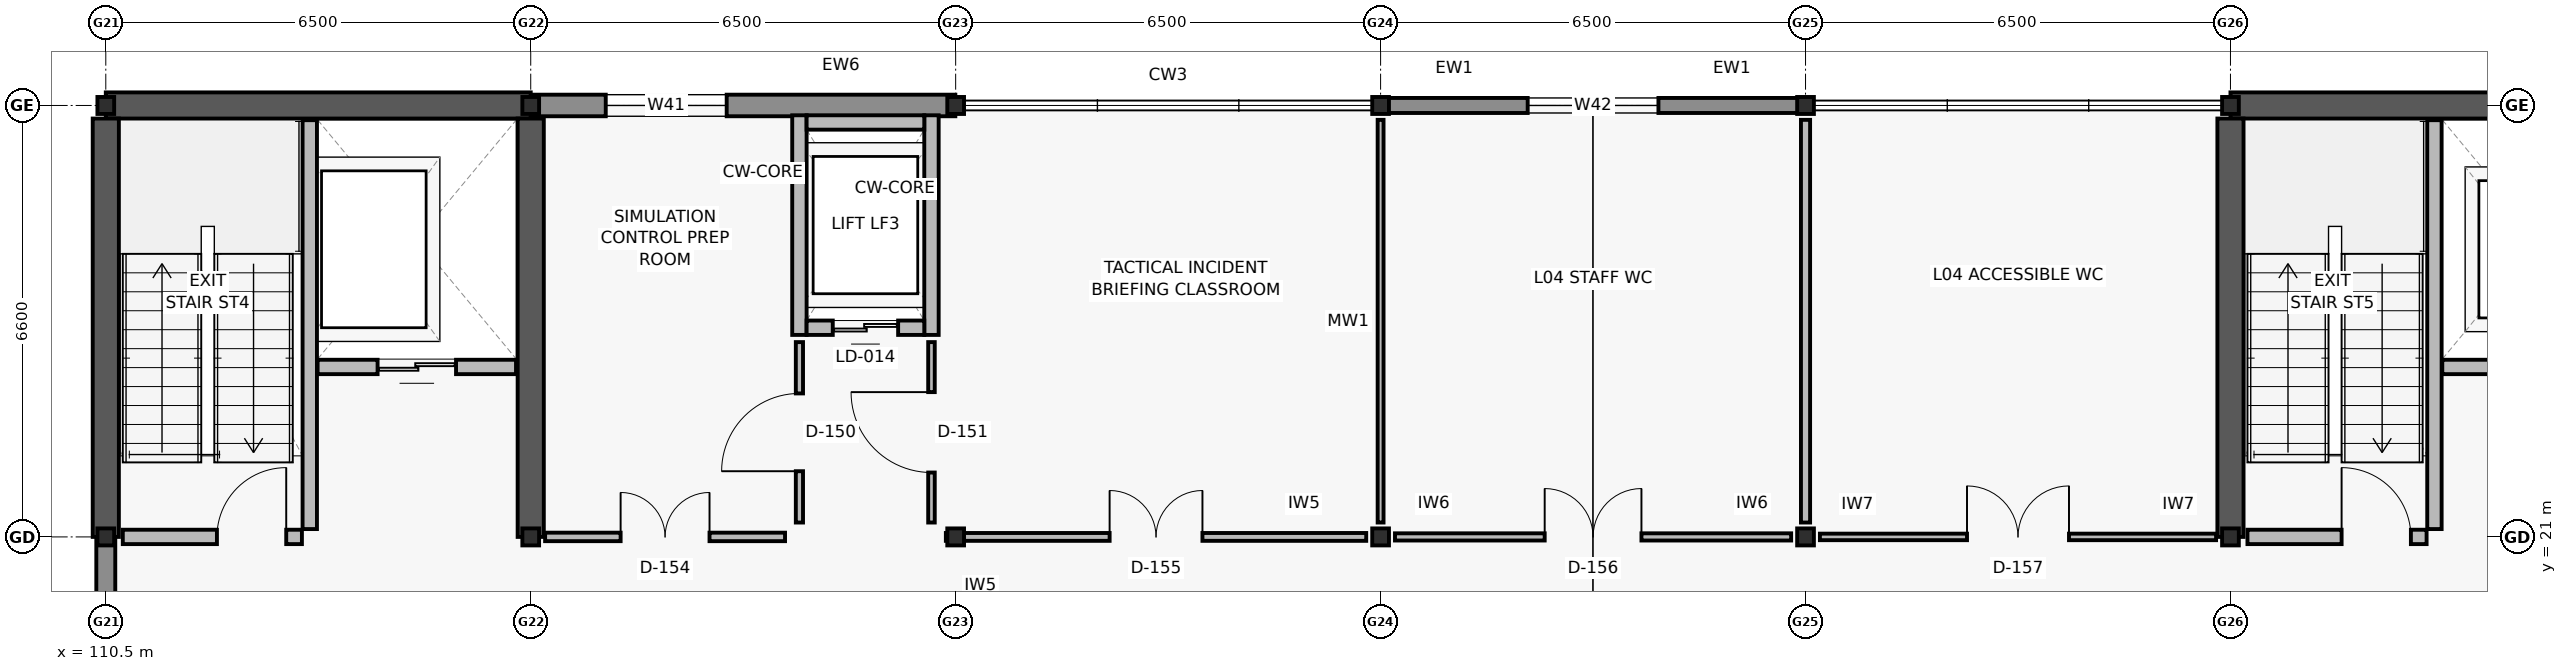
"""IFC4 building model, lengths in metres.
Left out: names, types, materials, properties, quantities, classifications, styles, units other than length and angle.
Written with IfcOpenShell. Run it as: python <this file> out.ifc"""

import sys

from ifc_helpers import new_model, si_unit, direction, frame, frame_2d, origin, origin_2d, place, context, subcontext, project, spatial, rectangle, i_section, extrude, element, fill, save


model = new_model("IFC4")
c1 = context("Model", 3, precision=1e-05, world=origin(), true_north=direction((0.0, 1.0)))
c2 = subcontext(c1, "Body", "Model", "MODEL_VIEW")
j1 = project(units=[si_unit("LENGTHUNIT", "METRE"), si_unit("PLANEANGLEUNIT", "RADIAN")], contexts=[c1])
p1 = place(None, origin())
s1 = spatial("IfcSite", under=j1, at=p1, CompositionType="ELEMENT")
p2 = place(p1, origin())
s2 = spatial("IfcBuilding", under=s1, at=p2, CompositionType="ELEMENT")
p3 = place(p2, frame((0.0, 0.0, 17.4)))
s3 = spatial("IfcBuildingStorey", under=s2, at=p3, CompositionType="ELEMENT", Elevation=17.4)
for number, where, z_axis, x_axis in (
    (1, (110.5, 21.0, 0.0), (0.0, 0.0, 1.0), (1.0, 0.0, 0.0)),
    (2, (110.5, 27.6, 0.0), (0.0, 0.0, 1.0), (1.0, 0.0, 0.0)),
    (3, (117.0, 21.0, 0.0), (0.0, 0.0, 1.0), (1.0, 0.0, 0.0)),
    (4, (117.0, 27.6, 0.0), (0.0, 0.0, 1.0), (1.0, 0.0, 0.0)),
    (5, (123.5, 21.0, 0.0), (0.0, 0.0, 1.0), (1.0, 0.0, 0.0)),
    (6, (123.5, 27.6, 0.0), (0.0, 0.0, 1.0), (1.0, 0.0, 0.0)),
    (7, (130.0, 21.0, 0.0), (0.0, 0.0, 1.0), (1.0, 0.0, 0.0)),
    (8, (130.0, 27.6, 0.0), (0.0, 0.0, 1.0), (1.0, 0.0, 0.0)),
    (9, (136.5, 21.0, 0.0), (0.0, 0.0, 1.0), (1.0, 0.0, 0.0)),
    (10, (136.5, 27.6, 0.0), (0.0, 0.0, 1.0), (1.0, 0.0, 0.0)),
    (11, (143.0, 21.0, 0.0), (0.0, 0.0, 1.0), (1.0, 0.0, 0.0)),
    (12, (143.0, 27.6, 0.0), (0.0, 0.0, 1.0), (1.0, 0.0, 0.0)),
):
    element("IfcColumn", number, at=place(p3, frame(where, z_axis=z_axis, x_axis=x_axis)), inside=s3, PredefinedType="COLUMN", context=c2, shape_type="SweptSolid", body=[
        extrude(i_section(OverallWidth=0.256, OverallDepth=0.26, WebThickness=0.01, FlangeThickness=0.017, FilletRadius=0.013, at=origin_2d()), origin(), (0.0, 0.0, 1.0), 3.9),
    ])
p4 = place(p3, frame((110.5, 27.6, 0.0), z_axis=(0.0, 0.0, 1.0), x_axis=(1.0, 0.0, 0.0)))
e13 = element("IfcWall", 13, at=p4, inside=s3, PredefinedType="SHEAR", context=c2, shape_type="SweptSolid", body=[
    extrude(rectangle(XDim=6.5, YDim=0.4, at=frame_2d((3.25, 0.0))), origin(), (0.0, 0.0, 1.0), 3.66),
])
for number, where, z_axis, x_axis in (
    (14, (110.5, 21.0, 0.0), (0.0, 0.0, 1.0), (0.0, 1.0, 0.0)),
    (15, (117.0, 21.0, 0.0), (0.0, 0.0, 1.0), (0.0, 1.0, 0.0)),
):
    element("IfcWall", number, at=place(p3, frame(where, z_axis=z_axis, x_axis=x_axis)), inside=s3, PredefinedType="SHEAR", context=c2, shape_type="SweptSolid", body=[
        extrude(rectangle(XDim=6.4, YDim=0.4, at=frame_2d((3.2, 0.0))), origin(), (0.0, 0.0, 1.0), 3.66),
    ])
p5 = place(p3, frame((143.0, 27.6, 0.0), z_axis=(0.0, 0.0, 1.0), x_axis=(1.0, 0.0, 0.0)))
e16 = element("IfcWall", 16, at=p5, inside=s3, PredefinedType="SHEAR", context=c2, shape_type="SweptSolid", body=[
    extrude(rectangle(XDim=6.5, YDim=0.4, at=frame_2d((3.25, 0.0))), origin(), (0.0, 0.0, 1.0), 3.66),
])
p6 = place(p3, frame((143.0, 21.0, 0.0), z_axis=(0.0, 0.0, 1.0), x_axis=(0.0, 1.0, 0.0)))
e17 = element("IfcWall", 17, at=p6, inside=s3, PredefinedType="SHEAR", context=c2, shape_type="SweptSolid", body=[
    extrude(rectangle(XDim=6.4, YDim=0.4, at=frame_2d((3.2, 0.0))), origin(), (0.0, 0.0, 1.0), 3.66),
])
p7 = place(p3, frame((117.005, 27.6, 0.0), z_axis=(0.0, 0.0, 1.0), x_axis=(1.0, 0.0, 0.0)))
e18 = element("IfcWall", 18, at=p7, inside=s3, PredefinedType="SOLIDWALL", context=c2, shape_type="SweptSolid", body=[
    extrude(rectangle(XDim=6.49, YDim=0.33, at=frame_2d((3.245, 0.0))), origin(), (0.0, 0.0, 1.0), 3.02),
])
p8 = place(p7, frame((1.143, 0.0, 0.8)))
e19 = element("IfcOpeningElement", 19, at=p8, cuts=e18, PredefinedType="OPENING", context=c2, shape_type="SweptSolid", body=[
    extrude(rectangle(XDim=1.85, YDim=1.55, at=frame_2d((0.925, 0.775))), frame((0.0, 0.175, 0.0), z_axis=(0.0, -1.0, 0.0), x_axis=(1.0, 0.0, 0.0)), (0.0, 0.0, 1.0), 0.35),
])
p9 = place(p3, frame((130.005, 27.6, 0.0), z_axis=(0.0, 0.0, 1.0), x_axis=(1.0, 0.0, 0.0)))
e20 = element("IfcWall", 20, at=p9, inside=s3, PredefinedType="SOLIDWALL", context=c2, shape_type="SweptSolid", body=[
    extrude(rectangle(XDim=6.49, YDim=0.23, at=frame_2d((3.245, 0.0))), origin(), (0.0, 0.0, 1.0), 3.02),
])
p10 = place(p9, frame((2.245, 0.0, 0.8)))
e21 = element("IfcOpeningElement", 21, at=p10, cuts=e20, PredefinedType="OPENING", context=c2, shape_type="SweptSolid", body=[
    extrude(rectangle(XDim=2.0, YDim=1.55, at=frame_2d((1.0, 0.775))), frame((0.0, 0.125, 0.0), z_axis=(0.0, -1.0, 0.0), x_axis=(1.0, 0.0, 0.0)), (0.0, 0.0, 1.0), 0.25),
])
p11 = place(p3, frame((110.5, 14.405, 0.0), z_axis=(0.0, 0.0, 1.0), x_axis=(0.0, 1.0, 0.0)))
e22 = element("IfcWall", 22, at=p11, inside=s3, PredefinedType="SOLIDWALL", context=c2, shape_type="SweptSolid", body=[
    extrude(rectangle(XDim=6.59, YDim=0.29, at=frame_2d((3.295, 0.0))), origin(), (0.0, 0.0, 1.0), 3.02),
])
p12 = place(p11, frame((0.762, 0.0, 0.8)))
e23 = element("IfcOpeningElement", 23, at=p12, cuts=e22, PredefinedType="OPENING", context=c2, shape_type="SweptSolid", body=[
    extrude(rectangle(XDim=2.3, YDim=1.55, at=frame_2d((1.15, 0.775))), frame((0.0, 0.155, 0.0), z_axis=(0.0, -1.0, 0.0), x_axis=(1.0, 0.0, 0.0)), (0.0, 0.0, 1.0), 0.31),
])
p13 = place(p3, frame((113.62, 21.12, 0.0), z_axis=(0.0, 0.0, 1.0), x_axis=(0.0, 1.0, 0.0)))
e24 = element("IfcWall", 24, at=p13, inside=s3, PredefinedType="SOLIDWALL", context=c2, shape_type="SweptSolid", body=[
    extrude(rectangle(XDim=6.255, YDim=0.22, at=frame_2d((3.127, 0.0))), origin(), (0.0, 0.0, 1.0), 3.66),
])
p14 = place(p3, frame((110.76, 21.0, 0.0), z_axis=(0.0, 0.0, 1.0), x_axis=(1.0, 0.0, 0.0)))
e25 = element("IfcWall", 25, at=p14, inside=s3, PredefinedType="SOLIDWALL", context=c2, shape_type="SweptSolid", body=[
    extrude(rectangle(XDim=2.74, YDim=0.22, at=frame_2d((1.37, 0.0))), origin(), (0.0, 0.0, 1.0), 3.02),
])
p15 = place(p14, frame((1.44, 0.0, 0.0)))
e26 = element("IfcOpeningElement", 26, at=p15, cuts=e25, PredefinedType="OPENING", context=c2, shape_type="SweptSolid", body=[
    extrude(rectangle(XDim=1.06, YDim=2.1, at=frame_2d((0.53, 1.05))), frame((0.0, 0.12, 0.0), z_axis=(0.0, -1.0, 0.0), x_axis=(1.0, 0.0, 0.0)), (0.0, 0.0, 1.0), 0.24),
])
p16 = place(p3, frame((113.74, 23.6, 0.0), z_axis=(0.0, 0.0, 1.0), x_axis=(1.0, 0.0, 0.0)))
e27 = element("IfcWall", 27, at=p16, inside=s3, PredefinedType="SOLIDWALL", context=c2, shape_type="SweptSolid", body=[
    extrude(rectangle(XDim=3.035, YDim=0.22, at=frame_2d((1.518, 0.0))), origin(), (0.0, 0.0, 1.0), 3.66),
])
p17 = place(p16, frame((0.917, 0.0, 0.0)))
e28 = element("IfcOpeningElement", 28, at=p17, cuts=e27, PredefinedType="OPENING", context=c2, shape_type="SweptSolid", body=[
    extrude(rectangle(XDim=1.2, YDim=2.15, at=frame_2d((0.6, 1.075))), frame((0.0, 0.12, 0.0), z_axis=(0.0, -1.0, 0.0), x_axis=(1.0, 0.0, 0.0)), (0.0, 0.0, 1.0), 0.24),
])
for number, where, z_axis, x_axis in (
    (29, (121.11, 24.09, 0.0), (0.0, 0.0, 1.0), (0.0, 1.0, 0.0)),
    (30, (123.13, 24.09, 0.0), (0.0, 0.0, 1.0), (0.0, 1.0, 0.0)),
):
    element("IfcWall", number, at=place(p3, frame(where, z_axis=z_axis, x_axis=x_axis)), inside=s3, PredefinedType="SOLIDWALL", context=c2, shape_type="SweptSolid", body=[
        extrude(rectangle(XDim=3.36, YDim=0.22, at=frame_2d((1.68, 0.0))), origin(), (0.0, 0.0, 1.0), 3.66),
    ])
p18 = place(p3, frame((121.22, 27.34, 0.0), z_axis=(0.0, 0.0, 1.0), x_axis=(1.0, 0.0, 0.0)))
e31 = element("IfcWall", 31, at=p18, inside=s3, PredefinedType="SOLIDWALL", context=c2, shape_type="SweptSolid", body=[
    extrude(rectangle(XDim=1.8, YDim=0.22, at=frame_2d((0.9, 0.0))), origin(), (0.0, 0.0, 1.0), 3.66),
])
p19 = place(p3, frame((121.22, 24.2, 0.0), z_axis=(0.0, 0.0, 1.0), x_axis=(1.0, 0.0, 0.0)))
e32 = element("IfcWall", 32, at=p19, inside=s3, PredefinedType="SOLIDWALL", context=c2, shape_type="SweptSolid", body=[
    extrude(rectangle(XDim=1.8, YDim=0.22, at=frame_2d((0.9, 0.0))), origin(), (0.0, 0.0, 1.0), 3.66),
])
p20 = place(p19, frame((0.4, 0.0, 0.0)))
e33 = element("IfcOpeningElement", 33, at=p20, cuts=e32, PredefinedType="OPENING", context=c2, shape_type="SweptSolid", body=[
    extrude(rectangle(XDim=1.0, YDim=2.1, at=frame_2d((0.5, 1.05))), frame((0.0, 0.12, 0.0), z_axis=(0.0, -1.0, 0.0), x_axis=(1.0, 0.0, 0.0)), (0.0, 0.0, 1.0), 0.24),
])
p21 = place(p3, frame((146.12, 21.12, 0.0), z_axis=(0.0, 0.0, 1.0), x_axis=(0.0, 1.0, 0.0)))
e34 = element("IfcWall", 34, at=p21, inside=s3, PredefinedType="SOLIDWALL", context=c2, shape_type="SweptSolid", body=[
    extrude(rectangle(XDim=6.255, YDim=0.22, at=frame_2d((3.127, 0.0))), origin(), (0.0, 0.0, 1.0), 3.66),
])
p22 = place(p3, frame((143.26, 21.0, 0.0), z_axis=(0.0, 0.0, 1.0), x_axis=(1.0, 0.0, 0.0)))
e35 = element("IfcWall", 35, at=p22, inside=s3, PredefinedType="SOLIDWALL", context=c2, shape_type="SweptSolid", body=[
    extrude(rectangle(XDim=2.74, YDim=0.22, at=frame_2d((1.37, 0.0))), origin(), (0.0, 0.0, 1.0), 3.02),
])
p23 = place(p22, frame((1.44, 0.0, 0.0)))
e36 = element("IfcOpeningElement", 36, at=p23, cuts=e35, PredefinedType="OPENING", context=c2, shape_type="SweptSolid", body=[
    extrude(rectangle(XDim=1.06, YDim=2.1, at=frame_2d((0.53, 1.05))), frame((0.0, 0.12, 0.0), z_axis=(0.0, -1.0, 0.0), x_axis=(1.0, 0.0, 0.0)), (0.0, 0.0, 1.0), 0.24),
])
p24 = place(p3, frame((146.24, 23.6, 0.0), z_axis=(0.0, 0.0, 1.0), x_axis=(1.0, 0.0, 0.0)))
e37 = element("IfcWall", 37, at=p24, inside=s3, PredefinedType="SOLIDWALL", context=c2, shape_type="SweptSolid", body=[
    extrude(rectangle(XDim=3.035, YDim=0.22, at=frame_2d((1.518, 0.0))), origin(), (0.0, 0.0, 1.0), 3.66),
])
p25 = place(p24, frame((0.968, 0.0, 0.0)))
e38 = element("IfcOpeningElement", 38, at=p25, cuts=e37, PredefinedType="OPENING", context=c2, shape_type="SweptSolid", body=[
    extrude(rectangle(XDim=1.1, YDim=2.1, at=frame_2d((0.55, 1.05))), frame((0.0, 0.12, 0.0), z_axis=(0.0, -1.0, 0.0), x_axis=(1.0, 0.0, 0.0)), (0.0, 0.0, 1.0), 0.24),
])
p26 = place(p3, frame((121.11, 21.22, 0.0), z_axis=(0.0, 0.0, 1.0), x_axis=(0.0, 1.0, 0.0)))
e39 = element("IfcWall", 39, at=p26, inside=s3, PredefinedType="PARTITIONING", context=c2, shape_type="SweptSolid", body=[
    extrude(rectangle(XDim=2.76, YDim=0.11, at=frame_2d((1.38, 0.0))), origin(), (0.0, 0.0, 1.0), 3.0),
])
p27 = place(p26, frame((0.785, 0.0, 0.0)))
e40 = element("IfcOpeningElement", 40, at=p27, cuts=e39, PredefinedType="OPENING", context=c2, shape_type="SweptSolid", body=[
    extrude(rectangle(XDim=1.19, YDim=2.14, at=frame_2d((0.595, 1.07))), frame((0.0, 0.065, 0.0), z_axis=(0.0, -1.0, 0.0), x_axis=(1.0, 0.0, 0.0)), (0.0, 0.0, 1.0), 0.13),
])
p28 = place(p3, frame((123.13, 21.22, 0.0), z_axis=(0.0, 0.0, 1.0), x_axis=(0.0, 1.0, 0.0)))
e41 = element("IfcWall", 41, at=p28, inside=s3, PredefinedType="PARTITIONING", context=c2, shape_type="SweptSolid", body=[
    extrude(rectangle(XDim=2.76, YDim=0.1, at=frame_2d((1.38, 0.0))), origin(), (0.0, 0.0, 1.0), 3.0),
])
p29 = place(p28, frame((0.765, 0.0, 0.0)))
e42 = element("IfcOpeningElement", 42, at=p29, cuts=e41, PredefinedType="OPENING", context=c2, shape_type="SweptSolid", body=[
    extrude(rectangle(XDim=1.23, YDim=2.08, at=frame_2d((0.615, 1.04))), frame((0.0, 0.06, 0.0), z_axis=(0.0, -1.0, 0.0), x_axis=(1.0, 0.0, 0.0)), (0.0, 0.0, 1.0), 0.12),
])
p30 = place(p3, frame((117.22, 21.0, 0.0), z_axis=(0.0, 0.0, 1.0), x_axis=(1.0, 0.0, 0.0)))
e43 = element("IfcWall", 43, at=p30, inside=s3, PredefinedType="PARTITIONING", context=c2, shape_type="SweptSolid", body=[
    extrude(rectangle(XDim=3.67, YDim=0.13, at=frame_2d((1.835, 0.0))), origin(), (0.0, 0.0, 1.0), 3.0),
])
p31 = place(p30, frame((1.155, 0.0, 0.0)))
e44 = element("IfcOpeningElement", 44, at=p31, cuts=e43, PredefinedType="OPENING", context=c2, shape_type="SweptSolid", body=[
    extrude(rectangle(XDim=1.36, YDim=2.15, at=frame_2d((0.68, 1.075))), frame((0.0, 0.075, 0.0), z_axis=(0.0, -1.0, 0.0), x_axis=(1.0, 0.0, 0.0)), (0.0, 0.0, 1.0), 0.15),
])
p32 = place(p3, frame((123.35, 21.0, 0.0), z_axis=(0.0, 0.0, 1.0), x_axis=(1.0, 0.0, 0.0)))
e45 = element("IfcWall", 45, at=p32, inside=s3, PredefinedType="PARTITIONING", context=c2, shape_type="SweptSolid", body=[
    extrude(rectangle(XDim=6.43, YDim=0.12, at=frame_2d((3.215, 0.0))), origin(), (0.0, 0.0, 1.0), 3.0),
])
p33 = place(p32, frame((2.505, 0.0, 0.0)))
e46 = element("IfcOpeningElement", 46, at=p33, cuts=e45, PredefinedType="OPENING", context=c2, shape_type="SweptSolid", body=[
    extrude(rectangle(XDim=1.42, YDim=2.15, at=frame_2d((0.71, 1.075))), frame((0.0, 0.07, 0.0), z_axis=(0.0, -1.0, 0.0), x_axis=(1.0, 0.0, 0.0)), (0.0, 0.0, 1.0), 0.14),
])
p34 = place(p3, frame((130.22, 21.0, 0.0), z_axis=(0.0, 0.0, 1.0), x_axis=(1.0, 0.0, 0.0)))
e47 = element("IfcWall", 47, at=p34, inside=s3, PredefinedType="PARTITIONING", context=c2, shape_type="SweptSolid", body=[
    extrude(rectangle(XDim=6.06, YDim=0.11, at=frame_2d((3.03, 0.0))), origin(), (0.0, 0.0, 1.0), 3.0),
])
p35 = place(p34, frame((2.29, 0.0, 0.0)))
e48 = element("IfcOpeningElement", 48, at=p35, cuts=e47, PredefinedType="OPENING", context=c2, shape_type="SweptSolid", body=[
    extrude(rectangle(XDim=1.48, YDim=2.18, at=frame_2d((0.74, 1.09))), frame((0.0, 0.065, 0.0), z_axis=(0.0, -1.0, 0.0), x_axis=(1.0, 0.0, 0.0)), (0.0, 0.0, 1.0), 0.13),
])
p36 = place(p3, frame((136.72, 21.0, 0.0), z_axis=(0.0, 0.0, 1.0), x_axis=(1.0, 0.0, 0.0)))
e49 = element("IfcWall", 49, at=p36, inside=s3, PredefinedType="PARTITIONING", context=c2, shape_type="SweptSolid", body=[
    extrude(rectangle(XDim=6.06, YDim=0.1, at=frame_2d((3.03, 0.0))), origin(), (0.0, 0.0, 1.0), 3.0),
])
p37 = place(p36, frame((2.25, 0.0, 0.0)))
e50 = element("IfcOpeningElement", 50, at=p37, cuts=e49, PredefinedType="OPENING", context=c2, shape_type="SweptSolid", body=[
    extrude(rectangle(XDim=1.56, YDim=2.18, at=frame_2d((0.78, 1.09))), frame((0.0, 0.06, 0.0), z_axis=(0.0, -1.0, 0.0), x_axis=(1.0, 0.0, 0.0)), (0.0, 0.0, 1.0), 0.12),
])
p38 = place(p3, frame((130.0, 21.22, 0.0), z_axis=(0.0, 0.0, 1.0), x_axis=(0.0, 1.0, 0.0)))
e51 = element("IfcWall", 51, at=p38, inside=s3, PredefinedType="MOVABLE", context=c2, shape_type="SweptSolid", body=[
    extrude(rectangle(XDim=6.16, YDim=0.09, at=frame_2d((3.08, 0.0))), origin(), (0.0, 0.0, 1.0), 3.0),
])
p39 = place(p3, frame((136.5, 21.22, 0.0), z_axis=(0.0, 0.0, 1.0), x_axis=(0.0, 1.0, 0.0)))
e52 = element("IfcWall", 52, at=p39, inside=s3, PredefinedType="PARTITIONING", context=c2, shape_type="SweptSolid", body=[
    extrude(rectangle(XDim=6.16, YDim=0.14, at=frame_2d((3.08, 0.0))), origin(), (0.0, 0.0, 1.0), 3.0),
])
p40 = place(p8, origin())
e53 = element("IfcWindow", 53, at=p40, inside=s3, PartitioningType="DOUBLE_PANEL_VERTICAL", PredefinedType="WINDOW", context=c2, shape_type="SweptSolid", body=[
    extrude(rectangle(XDim=1.85, YDim=1.55, at=frame_2d((0.925, 0.775))), frame((0.0, 0.03, 0.0), z_axis=(0.0, -1.0, 0.0), x_axis=(1.0, 0.0, 0.0)), (0.0, 0.0, 1.0), 0.06),
])
fill(e19, e53)
p41 = place(p10, origin())
e54 = element("IfcWindow", 54, at=p41, inside=s3, PartitioningType="DOUBLE_PANEL_VERTICAL", PredefinedType="WINDOW", context=c2, shape_type="SweptSolid", body=[
    extrude(rectangle(XDim=2.0, YDim=1.55, at=frame_2d((1.0, 0.775))), frame((0.0, 0.03, 0.0), z_axis=(0.0, -1.0, 0.0), x_axis=(1.0, 0.0, 0.0)), (0.0, 0.0, 1.0), 0.06),
])
fill(e21, e54)
p42 = place(p15, origin())
e55 = element("IfcDoor", 55, at=p42, inside=s3, OperationType="SINGLE_SWING_RIGHT", PredefinedType="DOOR", context=c2, shape_type="SweptSolid", body=[
    extrude(rectangle(XDim=1.06, YDim=2.1, at=frame_2d((0.53, 1.05))), frame((0.0, 0.025, 0.0), z_axis=(0.0, -1.0, 0.0), x_axis=(1.0, 0.0, 0.0)), (0.0, 0.0, 1.0), 0.05),
])
fill(e26, e55)
p43 = place(p17, origin())
e56 = element("IfcDoor", 56, at=p43, inside=s3, OperationType="DOUBLE_DOOR_SLIDING", PredefinedType="DOOR", context=c2, shape_type="SweptSolid", body=[
    extrude(rectangle(XDim=1.2, YDim=2.15, at=frame_2d((0.6, 1.075))), frame((0.0, 0.025, 0.0), z_axis=(0.0, -1.0, 0.0), x_axis=(1.0, 0.0, 0.0)), (0.0, 0.0, 1.0), 0.05),
])
fill(e28, e56)
p44 = place(p20, origin())
e57 = element("IfcDoor", 57, at=p44, inside=s3, OperationType="DOUBLE_DOOR_SLIDING", PredefinedType="DOOR", context=c2, shape_type="SweptSolid", body=[
    extrude(rectangle(XDim=1.0, YDim=2.1, at=frame_2d((0.5, 1.05))), frame((0.0, 0.025, 0.0), z_axis=(0.0, -1.0, 0.0), x_axis=(1.0, 0.0, 0.0)), (0.0, 0.0, 1.0), 0.05),
])
fill(e33, e57)
p45 = place(p23, origin())
e58 = element("IfcDoor", 58, at=p45, inside=s3, OperationType="SINGLE_SWING_LEFT", PredefinedType="DOOR", context=c2, shape_type="SweptSolid", body=[
    extrude(rectangle(XDim=1.06, YDim=2.1, at=frame_2d((0.53, 1.05))), frame((0.0, 0.025, 0.0), z_axis=(0.0, -1.0, 0.0), x_axis=(1.0, 0.0, 0.0)), (0.0, 0.0, 1.0), 0.05),
])
fill(e36, e58)
p46 = place(p27, origin())
e59 = element("IfcDoor", 59, at=p46, inside=s3, OperationType="SINGLE_SWING_LEFT", PredefinedType="DOOR", context=c2, shape_type="SweptSolid", body=[
    extrude(rectangle(XDim=1.19, YDim=2.14, at=frame_2d((0.595, 1.07))), frame((0.0, 0.025, 0.0), z_axis=(0.0, -1.0, 0.0), x_axis=(1.0, 0.0, 0.0)), (0.0, 0.0, 1.0), 0.05),
])
fill(e40, e59)
p47 = place(p29, origin())
e60 = element("IfcDoor", 60, at=p47, inside=s3, OperationType="SINGLE_SWING_RIGHT", PredefinedType="DOOR", context=c2, shape_type="SweptSolid", body=[
    extrude(rectangle(XDim=1.23, YDim=2.08, at=frame_2d((0.615, 1.04))), frame((0.0, 0.025, 0.0), z_axis=(0.0, -1.0, 0.0), x_axis=(1.0, 0.0, 0.0)), (0.0, 0.0, 1.0), 0.05),
])
fill(e42, e60)
p48 = place(p31, origin())
e61 = element("IfcDoor", 61, at=p48, inside=s3, OperationType="DOUBLE_DOOR_SINGLE_SWING", PredefinedType="DOOR", context=c2, shape_type="SweptSolid", body=[
    extrude(rectangle(XDim=1.36, YDim=2.15, at=frame_2d((0.68, 1.075))), frame((0.0, 0.025, 0.0), z_axis=(0.0, -1.0, 0.0), x_axis=(1.0, 0.0, 0.0)), (0.0, 0.0, 1.0), 0.05),
])
fill(e44, e61)
p49 = place(p33, origin())
e62 = element("IfcDoor", 62, at=p49, inside=s3, OperationType="DOUBLE_DOOR_SINGLE_SWING", PredefinedType="DOOR", context=c2, shape_type="SweptSolid", body=[
    extrude(rectangle(XDim=1.42, YDim=2.15, at=frame_2d((0.71, 1.075))), frame((0.0, 0.025, 0.0), z_axis=(0.0, -1.0, 0.0), x_axis=(1.0, 0.0, 0.0)), (0.0, 0.0, 1.0), 0.05),
])
fill(e46, e62)
p50 = place(p35, origin())
e63 = element("IfcDoor", 63, at=p50, inside=s3, OperationType="DOUBLE_DOOR_SINGLE_SWING", PredefinedType="DOOR", context=c2, shape_type="SweptSolid", body=[
    extrude(rectangle(XDim=1.48, YDim=2.18, at=frame_2d((0.74, 1.09))), frame((0.0, 0.025, 0.0), z_axis=(0.0, -1.0, 0.0), x_axis=(1.0, 0.0, 0.0)), (0.0, 0.0, 1.0), 0.05),
])
fill(e48, e63)
p51 = place(p37, origin())
e64 = element("IfcDoor", 64, at=p51, inside=s3, OperationType="DOUBLE_DOOR_SINGLE_SWING", PredefinedType="DOOR", context=c2, shape_type="SweptSolid", body=[
    extrude(rectangle(XDim=1.56, YDim=2.18, at=frame_2d((0.78, 1.09))), frame((0.0, 0.025, 0.0), z_axis=(0.0, -1.0, 0.0), x_axis=(1.0, 0.0, 0.0)), (0.0, 0.0, 1.0), 0.05),
])
fill(e50, e64)
save(model, sys.argv[1])
